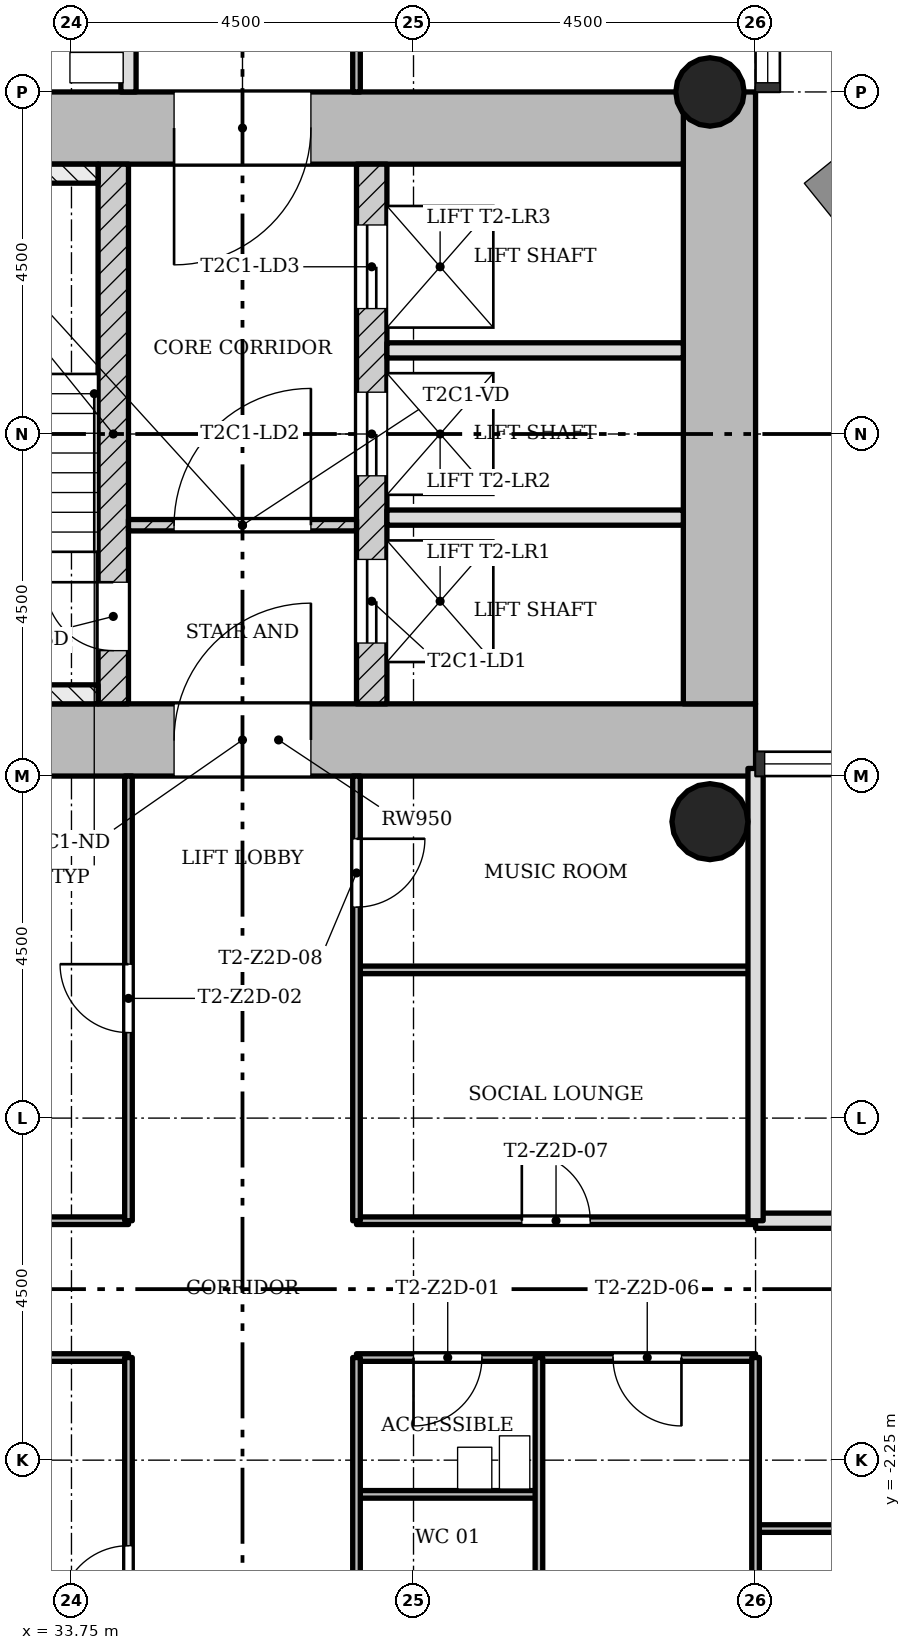
"""IFC4 building model, lengths in metres.
Left out: names, types, materials, properties, quantities, classifications, styles, units other than length and angle.
Written with IfcOpenShell. Run it as: python <this file> out.ifc"""

import sys

from ifc_helpers import new_model, si_unit, direction, frame, frame_2d, origin, origin_2d, place, context, subcontext, project, spatial, rectangle, hollow_circle, extrude, element, fill, save


model = new_model("IFC4")
c1 = context("Model", 3, precision=1e-05, world=origin(), true_north=direction((0.0, 1.0)))
c2 = subcontext(c1, "Body", "Model", "MODEL_VIEW")
j1 = project(units=[si_unit("LENGTHUNIT", "METRE"), si_unit("PLANEANGLEUNIT", "RADIAN")], contexts=[c1])
p1 = place(None, origin())
s1 = spatial("IfcSite", under=j1, at=p1, CompositionType="ELEMENT")
p2 = place(p1, origin())
s2 = spatial("IfcBuilding", under=s1, at=p2, CompositionType="ELEMENT")
p3 = place(p2, frame((0.0, 0.0, 120.8)))
s3 = spatial("IfcBuildingStorey", under=s2, at=p3, CompositionType="ELEMENT", Elevation=120.8)
p4 = place(p3, frame((30.2, 7.225, 0.0), z_axis=(0.0, 0.0, 1.0), x_axis=(1.0, 0.0, 0.0)))
e1 = element("IfcWall", 1, at=p4, inside=s3, PredefinedType="SHEAR", context=c2, shape_type="SweptSolid", body=[
    extrude(rectangle(XDim=12.55, YDim=0.95, at=frame_2d((6.275, 0.0))), origin(), (0.0, 0.0, 1.0), 3.4),
])
p5 = place(p4, frame((4.9, 0.0, 0.0)))
e2 = element("IfcOpeningElement", 2, at=p5, cuts=e1, PredefinedType="OPENING", context=c2, shape_type="SweptSolid", body=[
    extrude(rectangle(XDim=1.8, YDim=2.1, at=frame_2d((0.9, 1.05))), frame((0.0, 0.485, 0.0), z_axis=(0.0, -1.0, 0.0), x_axis=(1.0, 0.0, 0.0)), (0.0, 0.0, 1.0), 0.97),
])
p6 = place(p3, frame((42.275, 7.7, 0.0), z_axis=(0.0, 0.0, 1.0), x_axis=(0.0, 1.0, 0.0)))
e3 = element("IfcWall", 3, at=p6, inside=s3, PredefinedType="SHEAR", context=c2, shape_type="SweptSolid", body=[
    extrude(rectangle(XDim=8.05, YDim=0.95, at=frame_2d((4.025, 0.0))), origin(), (0.0, 0.0, 1.0), 3.4),
])
p7 = place(p3, frame((41.8, 15.275, 0.0), z_axis=(0.0, 0.0, 1.0), x_axis=(-1.0, 0.0, 0.0)))
e4 = element("IfcWall", 4, at=p7, inside=s3, PredefinedType="SHEAR", context=c2, shape_type="SweptSolid", body=[
    extrude(rectangle(XDim=12.55, YDim=0.95, at=frame_2d((6.275, 0.0))), origin(), (0.0, 0.0, 1.0), 3.4),
])
p8 = place(p7, frame((4.9, 0.0, 0.0)))
e5 = element("IfcOpeningElement", 5, at=p8, cuts=e4, PredefinedType="OPENING", context=c2, shape_type="SweptSolid", body=[
    extrude(rectangle(XDim=1.8, YDim=2.1, at=frame_2d((0.9, 1.05))), frame((0.0, 0.485, 0.0), z_axis=(0.0, -1.0, 0.0), x_axis=(1.0, 0.0, 0.0)), (0.0, 0.0, 1.0), 0.97),
])
p9 = place(p3, frame((34.3, 7.7, 0.0), z_axis=(0.0, 0.0, 1.0), x_axis=(0.0, 1.0, 0.0)))
e6 = element("IfcWall", 6, at=p9, inside=s3, PredefinedType="SHEAR", context=c2, shape_type="SweptSolid", body=[
    extrude(rectangle(XDim=7.1, YDim=0.4, at=frame_2d((3.55, 0.0))), origin(), (0.0, 0.0, 1.0), 3.4),
])
p10 = place(p9, frame((0.7, 0.0, 0.0)))
e7 = element("IfcOpeningElement", 7, at=p10, cuts=e6, PredefinedType="OPENING", context=c2, shape_type="SweptSolid", body=[
    extrude(rectangle(XDim=0.9, YDim=2.1, at=frame_2d((0.45, 1.05))), frame((0.0, 0.21, 0.0), z_axis=(0.0, -1.0, 0.0), x_axis=(1.0, 0.0, 0.0)), (0.0, 0.0, 1.0), 0.42),
])
p11 = place(p3, frame((37.7, 7.7, 0.0), z_axis=(0.0, 0.0, 1.0), x_axis=(0.0, 1.0, 0.0)))
e8 = element("IfcWall", 8, at=p11, inside=s3, PredefinedType="SHEAR", context=c2, shape_type="SweptSolid", body=[
    extrude(rectangle(XDim=7.1, YDim=0.4, at=frame_2d((3.55, 0.0))), origin(), (0.0, 0.0, 1.0), 3.4),
])
p12 = place(p11, frame((0.8, 0.0, 0.0)))
e9 = element("IfcOpeningElement", 9, at=p12, cuts=e8, PredefinedType="OPENING", context=c2, shape_type="SweptSolid", body=[
    extrude(rectangle(XDim=1.1, YDim=2.1, at=frame_2d((0.55, 1.05))), frame((0.0, 0.21, 0.0), z_axis=(0.0, -1.0, 0.0), x_axis=(1.0, 0.0, 0.0)), (0.0, 0.0, 1.0), 0.42),
])
p13 = place(p11, frame((3.0, 0.0, 0.0)))
e10 = element("IfcOpeningElement", 10, at=p13, cuts=e8, PredefinedType="OPENING", context=c2, shape_type="SweptSolid", body=[
    extrude(rectangle(XDim=1.1, YDim=2.1, at=frame_2d((0.55, 1.05))), frame((0.0, 0.21, 0.0), z_axis=(0.0, -1.0, 0.0), x_axis=(1.0, 0.0, 0.0)), (0.0, 0.0, 1.0), 0.42),
])
p14 = place(p11, frame((5.2, 0.0, 0.0)))
e11 = element("IfcOpeningElement", 11, at=p14, cuts=e8, PredefinedType="OPENING", context=c2, shape_type="SweptSolid", body=[
    extrude(rectangle(XDim=1.1, YDim=2.1, at=frame_2d((0.55, 1.05))), frame((0.0, 0.21, 0.0), z_axis=(0.0, -1.0, 0.0), x_axis=(1.0, 0.0, 0.0)), (0.0, 0.0, 1.0), 0.42),
])
p15 = place(p3, frame((42.15, 15.75, 0.0), z_axis=(0.0, 0.0, 1.0), x_axis=(1.0, 0.0, 0.0)))
e12 = element("IfcColumn", 12, at=p15, inside=s3, PredefinedType="COLUMN", context=c2, shape_type="SweptSolid", body=[
    extrude(hollow_circle(Radius=0.45, WallThickness=0.032, at=origin_2d()), origin(), (0.0, 0.0, 1.0), 3.4),
])
p16 = place(p3, frame((42.15, 6.15, 0.0), z_axis=(0.0, 0.0, 1.0), x_axis=(1.0, 0.0, 0.0)))
e13 = element("IfcColumn", 13, at=p16, inside=s3, PredefinedType="COLUMN", context=c2, shape_type="SweptSolid", body=[
    extrude(hollow_circle(Radius=0.5, WallThickness=0.036, at=origin_2d()), origin(), (0.0, 0.0, 1.0), 3.4),
])
p17 = place(p3, frame((37.5, 10.05, 0.0), z_axis=(0.0, 0.0, 1.0), x_axis=(-1.0, 0.0, 0.0)))
e14 = element("IfcWall", 14, at=p17, inside=s3, PredefinedType="PARTITIONING", context=c2, shape_type="SweptSolid", body=[
    extrude(rectangle(XDim=3.0, YDim=0.15, at=frame_2d((1.5, 0.0))), origin(), (0.0, 0.0, 1.0), 3.0),
])
p18 = place(p17, frame((0.6, 0.0, 0.0)))
e15 = element("IfcOpeningElement", 15, at=p18, cuts=e14, PredefinedType="OPENING", context=c2, shape_type="SweptSolid", body=[
    extrude(rectangle(XDim=1.8, YDim=2.1, at=frame_2d((0.9, 1.05))), frame((0.0, 0.085, 0.0), z_axis=(0.0, -1.0, 0.0), x_axis=(1.0, 0.0, 0.0)), (0.0, 0.0, 1.0), 0.17),
])
for number, where, z_axis, x_axis in (
    (16, (41.8, 10.15, 0.0), (0.0, 0.0, 1.0), (-1.0, 0.0, 0.0)),
    (17, (41.8, 12.35, 0.0), (0.0, 0.0, 1.0), (-1.0, 0.0, 0.0)),
):
    element("IfcWall", number, at=place(p3, frame(where, z_axis=z_axis, x_axis=x_axis)), inside=s3, PredefinedType="SOLIDWALL", context=c2, shape_type="SweptSolid", body=[
        extrude(rectangle(XDim=3.9, YDim=0.2, at=frame_2d((1.95, 0.0))), origin(), (0.0, 0.0, 1.0), 3.0),
    ])
p19 = place(p3, frame((51.75, -3.15, 0.0), z_axis=(0.0, 0.0, 1.0), x_axis=(-1.0, 0.0, 0.0)))
e18 = element("IfcWall", 18, at=p19, inside=s3, PredefinedType="PARTITIONING", context=c2, shape_type="SweptSolid", body=[
    extrude(rectangle(XDim=9.0, YDim=0.1, at=frame_2d((4.5, 0.0))), origin(), (0.0, 0.0, 1.0), 3.0),
])
p20 = place(p19, frame((5.55, 0.0, 0.0)))
e19 = element("IfcOpeningElement", 19, at=p20, cuts=e18, PredefinedType="OPENING", context=c2, shape_type="SweptSolid", body=[
    extrude(rectangle(XDim=0.9, YDim=2.1, at=frame_2d((0.45, 1.05))), frame((0.0, 0.06, 0.0), z_axis=(0.0, -1.0, 0.0), x_axis=(1.0, 0.0, 0.0)), (0.0, 0.0, 1.0), 0.12),
])
p21 = place(p3, frame((39.9, -2.7, 0.0), z_axis=(0.0, 0.0, 1.0), x_axis=(-1.0, 0.0, 0.0)))
e20 = element("IfcWall", 20, at=p21, inside=s3, PredefinedType="PARTITIONING", context=c2, shape_type="SweptSolid", body=[
    extrude(rectangle(XDim=2.4, YDim=0.1, at=frame_2d((1.2, 0.0))), origin(), (0.0, 0.0, 1.0), 3.0),
])
p22 = place(p3, frame((42.75, -0.9, 0.0), z_axis=(0.0, 0.0, 1.0), x_axis=(-1.0, 0.0, 0.0)))
e21 = element("IfcWall", 21, at=p22, inside=s3, PredefinedType="PARTITIONING", context=c2, shape_type="SweptSolid", body=[
    extrude(rectangle(XDim=5.25, YDim=0.1, at=frame_2d((2.625, 0.0))), origin(), (0.0, 0.0, 1.0), 3.0),
])
p23 = place(p22, frame((3.6, 0.0, 0.0)))
e22 = element("IfcOpeningElement", 22, at=p23, cuts=e21, PredefinedType="OPENING", context=c2, shape_type="SweptSolid", body=[
    extrude(rectangle(XDim=0.9, YDim=2.1, at=frame_2d((0.45, 1.05))), frame((0.0, 0.06, 0.0), z_axis=(0.0, -1.0, 0.0), x_axis=(1.0, 0.0, 0.0)), (0.0, 0.0, 1.0), 0.12),
])
p24 = place(p22, frame((0.975, 0.0, 0.0)))
e23 = element("IfcOpeningElement", 23, at=p24, cuts=e21, PredefinedType="OPENING", context=c2, shape_type="SweptSolid", body=[
    extrude(rectangle(XDim=0.9, YDim=2.1, at=frame_2d((0.45, 1.05))), frame((0.0, 0.06, 0.0), z_axis=(0.0, -1.0, 0.0), x_axis=(1.0, 0.0, 0.0)), (0.0, 0.0, 1.0), 0.12),
])
p25 = place(p3, frame((34.5, -0.9, 0.0), z_axis=(0.0, 0.0, 1.0), x_axis=(-1.0, 0.0, 0.0)))
e24 = element("IfcWall", 24, at=p25, inside=s3, PredefinedType="PARTITIONING", context=c2, shape_type="SweptSolid", body=[
    extrude(rectangle(XDim=5.25, YDim=0.1, at=frame_2d((2.625, 0.0))), origin(), (0.0, 0.0, 1.0), 3.0),
])
p26 = place(p25, frame((3.525, 0.0, 0.0)))
e25 = element("IfcOpeningElement", 25, at=p26, cuts=e24, PredefinedType="OPENING", context=c2, shape_type="SweptSolid", body=[
    extrude(rectangle(XDim=0.9, YDim=2.1, at=frame_2d((0.45, 1.05))), frame((0.0, 0.06, 0.0), z_axis=(0.0, -1.0, 0.0), x_axis=(1.0, 0.0, 0.0)), (0.0, 0.0, 1.0), 0.12),
])
p27 = place(p3, frame((42.75, 0.9, 0.0), z_axis=(0.0, 0.0, 1.0), x_axis=(-1.0, 0.0, 0.0)))
e26 = element("IfcWall", 26, at=p27, inside=s3, PredefinedType="PARTITIONING", context=c2, shape_type="SweptSolid", body=[
    extrude(rectangle(XDim=5.25, YDim=0.1, at=frame_2d((2.625, 0.0))), origin(), (0.0, 0.0, 1.0), 3.0),
])
p28 = place(p27, frame((2.175, 0.0, 0.0)))
e27 = element("IfcOpeningElement", 27, at=p28, cuts=e26, PredefinedType="OPENING", context=c2, shape_type="SweptSolid", body=[
    extrude(rectangle(XDim=0.9, YDim=2.1, at=frame_2d((0.45, 1.05))), frame((0.0, 0.06, 0.0), z_axis=(0.0, -1.0, 0.0), x_axis=(1.0, 0.0, 0.0)), (0.0, 0.0, 1.0), 0.12),
])
p29 = place(p3, frame((34.5, 0.9, 0.0), z_axis=(0.0, 0.0, 1.0), x_axis=(-1.0, 0.0, 0.0)))
e28 = element("IfcWall", 28, at=p29, inside=s3, PredefinedType="PARTITIONING", context=c2, shape_type="SweptSolid", body=[
    extrude(rectangle(XDim=5.25, YDim=0.1, at=frame_2d((2.625, 0.0))), origin(), (0.0, 0.0, 1.0), 3.0),
])
p30 = place(p3, frame((44.55, 0.9, 0.0), z_axis=(0.0, 0.0, 1.0), x_axis=(-1.0, 0.0, 0.0)))
e29 = element("IfcWall", 29, at=p30, inside=s3, PredefinedType="SOLIDWALL", context=c2, shape_type="SweptSolid", body=[
    extrude(rectangle(XDim=1.8, YDim=0.2, at=frame_2d((0.9, 0.0))), origin(), (0.0, 0.0, 1.0), 3.0),
])
p31 = place(p3, frame((42.75, 4.2, 0.0), z_axis=(0.0, 0.0, 1.0), x_axis=(-1.0, 0.0, 0.0)))
e30 = element("IfcWall", 30, at=p31, inside=s3, PredefinedType="PARTITIONING", context=c2, shape_type="SweptSolid", body=[
    extrude(rectangle(XDim=5.25, YDim=0.1, at=frame_2d((2.625, 0.0))), origin(), (0.0, 0.0, 1.0), 3.0),
])
p32 = place(p3, frame((42.75, -6.85, 0.0), z_axis=(0.0, 0.0, 1.0), x_axis=(0.0, 1.0, 0.0)))
e31 = element("IfcWall", 31, at=p32, inside=s3, PredefinedType="PARTITIONING", context=c2, shape_type="SweptSolid", body=[
    extrude(rectangle(XDim=5.95, YDim=0.1, at=frame_2d((2.975, 0.0))), origin(), (0.0, 0.0, 1.0), 3.0),
])
p33 = place(p3, frame((42.75, 0.9, 0.0), z_axis=(0.0, 0.0, 1.0), x_axis=(0.0, 1.0, 0.0)))
e32 = element("IfcWall", 32, at=p33, inside=s3, PredefinedType="SOLIDWALL", context=c2, shape_type="SweptSolid", body=[
    extrude(rectangle(XDim=5.95, YDim=0.2, at=frame_2d((2.975, 0.0))), origin(), (0.0, 0.0, 1.0), 3.0),
])
p34 = place(p3, frame((39.9, -6.75, 0.0), z_axis=(0.0, 0.0, 1.0), x_axis=(0.0, 1.0, 0.0)))
e33 = element("IfcWall", 33, at=p34, inside=s3, PredefinedType="PARTITIONING", context=c2, shape_type="SweptSolid", body=[
    extrude(rectangle(XDim=5.85, YDim=0.1, at=frame_2d((2.925, 0.0))), origin(), (0.0, 0.0, 1.0), 3.0),
])
p35 = place(p3, frame((37.5, -6.75, 0.0), z_axis=(0.0, 0.0, 1.0), x_axis=(0.0, 1.0, 0.0)))
e34 = element("IfcWall", 34, at=p35, inside=s3, PredefinedType="PARTITIONING", context=c2, shape_type="SweptSolid", body=[
    extrude(rectangle(XDim=5.85, YDim=0.1, at=frame_2d((2.925, 0.0))), origin(), (0.0, 0.0, 1.0), 3.0),
])
p36 = place(p35, frame((1.575, 0.0, 0.0)))
e35 = element("IfcOpeningElement", 35, at=p36, cuts=e34, PredefinedType="OPENING", context=c2, shape_type="SweptSolid", body=[
    extrude(rectangle(XDim=0.9, YDim=2.1, at=frame_2d((0.45, 1.05))), frame((0.0, 0.06, 0.0), z_axis=(0.0, -1.0, 0.0), x_axis=(1.0, 0.0, 0.0)), (0.0, 0.0, 1.0), 0.12),
])
p37 = place(p3, frame((37.5, 0.9, 0.0), z_axis=(0.0, 0.0, 1.0), x_axis=(0.0, 1.0, 0.0)))
e36 = element("IfcWall", 36, at=p37, inside=s3, PredefinedType="PARTITIONING", context=c2, shape_type="SweptSolid", body=[
    extrude(rectangle(XDim=5.85, YDim=0.1, at=frame_2d((2.925, 0.0))), origin(), (0.0, 0.0, 1.0), 3.0),
])
p38 = place(p37, frame((4.125, 0.0, 0.0)))
e37 = element("IfcOpeningElement", 37, at=p38, cuts=e36, PredefinedType="OPENING", context=c2, shape_type="SweptSolid", body=[
    extrude(rectangle(XDim=0.9, YDim=2.1, at=frame_2d((0.45, 1.05))), frame((0.0, 0.06, 0.0), z_axis=(0.0, -1.0, 0.0), x_axis=(1.0, 0.0, 0.0)), (0.0, 0.0, 1.0), 0.12),
])
p39 = place(p3, frame((37.5, 15.75, 0.0), z_axis=(0.0, 0.0, 1.0), x_axis=(0.0, 1.0, 0.0)))
e38 = element("IfcWall", 38, at=p39, inside=s3, PredefinedType="PARTITIONING", context=c2, shape_type="SweptSolid", body=[
    extrude(rectangle(XDim=4.5, YDim=0.1, at=frame_2d((2.25, 0.0))), origin(), (0.0, 0.0, 1.0), 3.0),
])
p40 = place(p39, frame((1.8, 0.0, 0.0)))
e39 = element("IfcOpeningElement", 39, at=p40, cuts=e38, PredefinedType="OPENING", context=c2, shape_type="SweptSolid", body=[
    extrude(rectangle(XDim=0.9, YDim=2.1, at=frame_2d((0.45, 1.05))), frame((0.0, 0.06, 0.0), z_axis=(0.0, -1.0, 0.0), x_axis=(1.0, 0.0, 0.0)), (0.0, 0.0, 1.0), 0.12),
])
p41 = place(p3, frame((34.5, -6.75, 0.0), z_axis=(0.0, 0.0, 1.0), x_axis=(0.0, 1.0, 0.0)))
e40 = element("IfcWall", 40, at=p41, inside=s3, PredefinedType="PARTITIONING", context=c2, shape_type="SweptSolid", body=[
    extrude(rectangle(XDim=5.85, YDim=0.1, at=frame_2d((2.925, 0.0))), origin(), (0.0, 0.0, 1.0), 3.0),
])
p42 = place(p41, frame((2.475, 0.0, 0.0)))
e41 = element("IfcOpeningElement", 41, at=p42, cuts=e40, PredefinedType="OPENING", context=c2, shape_type="SweptSolid", body=[
    extrude(rectangle(XDim=0.9, YDim=2.1, at=frame_2d((0.45, 1.05))), frame((0.0, 0.06, 0.0), z_axis=(0.0, -1.0, 0.0), x_axis=(1.0, 0.0, 0.0)), (0.0, 0.0, 1.0), 0.12),
])
p43 = place(p3, frame((34.5, 0.9, 0.0), z_axis=(0.0, 0.0, 1.0), x_axis=(0.0, 1.0, 0.0)))
e42 = element("IfcWall", 42, at=p43, inside=s3, PredefinedType="PARTITIONING", context=c2, shape_type="SweptSolid", body=[
    extrude(rectangle(XDim=5.85, YDim=0.1, at=frame_2d((2.925, 0.0))), origin(), (0.0, 0.0, 1.0), 3.0),
])
p44 = place(p43, frame((2.475, 0.0, 0.0)))
e43 = element("IfcOpeningElement", 43, at=p44, cuts=e42, PredefinedType="OPENING", context=c2, shape_type="SweptSolid", body=[
    extrude(rectangle(XDim=0.9, YDim=2.1, at=frame_2d((0.45, 1.05))), frame((0.0, 0.06, 0.0), z_axis=(0.0, -1.0, 0.0), x_axis=(1.0, 0.0, 0.0)), (0.0, 0.0, 1.0), 0.12),
])
p45 = place(p3, frame((34.5, 15.75, 0.0), z_axis=(0.0, 0.0, 1.0), x_axis=(0.0, 1.0, 0.0)))
e44 = element("IfcWall", 44, at=p45, inside=s3, PredefinedType="SOLIDWALL", context=c2, shape_type="SweptSolid", body=[
    extrude(rectangle(XDim=4.5, YDim=0.2, at=frame_2d((2.25, 0.0))), origin(), (0.0, 0.0, 1.0), 3.0),
])
p46 = place(p45, frame((3.0, 0.0, 0.0)))
e45 = element("IfcOpeningElement", 45, at=p46, cuts=e44, PredefinedType="OPENING", context=c2, shape_type="SweptSolid", body=[
    extrude(rectangle(XDim=0.9, YDim=2.1, at=frame_2d((0.45, 1.05))), frame((0.0, 0.11, 0.0), z_axis=(0.0, -1.0, 0.0), x_axis=(1.0, 0.0, 0.0)), (0.0, 0.0, 1.0), 0.22),
])
for number, where, z_axis, x_axis in (
    (46, (34.1, 14.675, 0.0), (0.0, 0.0, 1.0), (-1.0, 0.0, 0.0)),
    (47, (34.1, 7.825, 0.0), (0.0, 0.0, 1.0), (-1.0, 0.0, 0.0)),
):
    element("IfcWall", number, at=place(p3, frame(where, z_axis=z_axis, x_axis=x_axis)), inside=s3, PredefinedType="SHEAR", context=c2, shape_type="SweptSolid", body=[
        extrude(rectangle(XDim=3.9, YDim=0.25, at=frame_2d((1.95, 0.0))), origin(), (0.0, 0.0, 1.0), 3.4),
    ])
p47 = place(p18, origin())
e48 = element("IfcDoor", 48, at=p47, inside=s3, OperationType="SINGLE_SWING_LEFT", PredefinedType="DOOR", context=c2, shape_type="SweptSolid", body=[
    extrude(rectangle(XDim=1.8, YDim=2.1, at=frame_2d((0.9, 1.05))), frame((0.0, 0.025, 0.0), z_axis=(0.0, -1.0, 0.0), x_axis=(1.0, 0.0, 0.0)), (0.0, 0.0, 1.0), 0.05),
])
fill(e15, e48)
p48 = place(p23, origin())
e49 = element("IfcDoor", 49, at=p48, inside=s3, OperationType="SINGLE_SWING_LEFT", PredefinedType="DOOR", context=c2, shape_type="SweptSolid", body=[
    extrude(rectangle(XDim=0.9, YDim=2.1, at=frame_2d((0.45, 1.05))), frame((0.0, 0.025, 0.0), z_axis=(0.0, -1.0, 0.0), x_axis=(1.0, 0.0, 0.0)), (0.0, 0.0, 1.0), 0.05),
])
fill(e22, e49)
p49 = place(p44, origin())
e50 = element("IfcDoor", 50, at=p49, inside=s3, OperationType="SINGLE_SWING_LEFT", PredefinedType="DOOR", context=c2, shape_type="SweptSolid", body=[
    extrude(rectangle(XDim=0.9, YDim=2.1, at=frame_2d((0.45, 1.05))), frame((0.0, 0.025, 0.0), z_axis=(0.0, -1.0, 0.0), x_axis=(1.0, 0.0, 0.0)), (0.0, 0.0, 1.0), 0.05),
])
fill(e43, e50)
p50 = place(p42, origin())
e51 = element("IfcDoor", 51, at=p50, inside=s3, OperationType="SINGLE_SWING_RIGHT", PredefinedType="DOOR", context=c2, shape_type="SweptSolid", body=[
    extrude(rectangle(XDim=0.9, YDim=2.1, at=frame_2d((0.45, 1.05))), frame((0.0, 0.025, 0.0), z_axis=(0.0, -1.0, 0.0), x_axis=(1.0, 0.0, 0.0)), (0.0, 0.0, 1.0), 0.05),
])
fill(e41, e51)
p51 = place(p24, origin())
e52 = element("IfcDoor", 52, at=p51, inside=s3, OperationType="SINGLE_SWING_RIGHT", PredefinedType="DOOR", context=c2, shape_type="SweptSolid", body=[
    extrude(rectangle(XDim=0.9, YDim=2.1, at=frame_2d((0.45, 1.05))), frame((0.0, 0.025, 0.0), z_axis=(0.0, -1.0, 0.0), x_axis=(1.0, 0.0, 0.0)), (0.0, 0.0, 1.0), 0.05),
])
fill(e23, e52)
p52 = place(p28, origin())
e53 = element("IfcDoor", 53, at=p52, inside=s3, OperationType="SINGLE_SWING_RIGHT", PredefinedType="DOOR", context=c2, shape_type="SweptSolid", body=[
    extrude(rectangle(XDim=0.9, YDim=2.1, at=frame_2d((0.45, 1.05))), frame((0.0, 0.025, 0.0), z_axis=(0.0, -1.0, 0.0), x_axis=(1.0, 0.0, 0.0)), (0.0, 0.0, 1.0), 0.05),
])
fill(e27, e53)
p53 = place(p38, origin())
e54 = element("IfcDoor", 54, at=p53, inside=s3, OperationType="SINGLE_SWING_RIGHT", PredefinedType="DOOR", context=c2, shape_type="SweptSolid", body=[
    extrude(rectangle(XDim=0.9, YDim=2.1, at=frame_2d((0.45, 1.05))), frame((0.0, 0.025, 0.0), z_axis=(0.0, -1.0, 0.0), x_axis=(1.0, 0.0, 0.0)), (0.0, 0.0, 1.0), 0.05),
])
fill(e37, e54)
p54 = place(p10, origin())
e55 = element("IfcDoor", 55, at=p54, inside=s3, OperationType="SINGLE_SWING_LEFT", PredefinedType="DOOR", context=c2, shape_type="SweptSolid", body=[
    extrude(rectangle(XDim=0.9, YDim=2.1, at=frame_2d((0.45, 1.05))), frame((0.0, 0.025, 0.0), z_axis=(0.0, -1.0, 0.0), x_axis=(1.0, 0.0, 0.0)), (0.0, 0.0, 1.0), 0.05),
])
fill(e7, e55)
p55 = place(p12, origin())
e56 = element("IfcDoor", 56, at=p55, inside=s3, OperationType="SLIDING_TO_LEFT", PredefinedType="DOOR", context=c2, shape_type="SweptSolid", body=[
    extrude(rectangle(XDim=1.1, YDim=2.1, at=frame_2d((0.55, 1.05))), frame((0.0, 0.025, 0.0), z_axis=(0.0, -1.0, 0.0), x_axis=(1.0, 0.0, 0.0)), (0.0, 0.0, 1.0), 0.05),
])
fill(e9, e56)
p56 = place(p13, origin())
e57 = element("IfcDoor", 57, at=p56, inside=s3, OperationType="SLIDING_TO_LEFT", PredefinedType="DOOR", context=c2, shape_type="SweptSolid", body=[
    extrude(rectangle(XDim=1.1, YDim=2.1, at=frame_2d((0.55, 1.05))), frame((0.0, 0.025, 0.0), z_axis=(0.0, -1.0, 0.0), x_axis=(1.0, 0.0, 0.0)), (0.0, 0.0, 1.0), 0.05),
])
fill(e10, e57)
p57 = place(p14, origin())
e58 = element("IfcDoor", 58, at=p57, inside=s3, OperationType="SLIDING_TO_LEFT", PredefinedType="DOOR", context=c2, shape_type="SweptSolid", body=[
    extrude(rectangle(XDim=1.1, YDim=2.1, at=frame_2d((0.55, 1.05))), frame((0.0, 0.025, 0.0), z_axis=(0.0, -1.0, 0.0), x_axis=(1.0, 0.0, 0.0)), (0.0, 0.0, 1.0), 0.05),
])
fill(e11, e58)
p58 = place(p5, origin())
e59 = element("IfcDoor", 59, at=p58, inside=s3, OperationType="SINGLE_SWING_LEFT", PredefinedType="DOOR", context=c2, shape_type="SweptSolid", body=[
    extrude(rectangle(XDim=1.8, YDim=2.1, at=frame_2d((0.9, 1.05))), frame((0.0, 0.025, 0.0), z_axis=(0.0, -1.0, 0.0), x_axis=(1.0, 0.0, 0.0)), (0.0, 0.0, 1.0), 0.05),
])
fill(e2, e59)
p59 = place(p8, origin())
e60 = element("IfcDoor", 60, at=p59, inside=s3, OperationType="SINGLE_SWING_LEFT", PredefinedType="DOOR", context=c2, shape_type="SweptSolid", body=[
    extrude(rectangle(XDim=1.8, YDim=2.1, at=frame_2d((0.9, 1.05))), frame((0.0, 0.025, 0.0), z_axis=(0.0, -1.0, 0.0), x_axis=(1.0, 0.0, 0.0)), (0.0, 0.0, 1.0), 0.05),
])
fill(e5, e60)
save(model, sys.argv[1])
